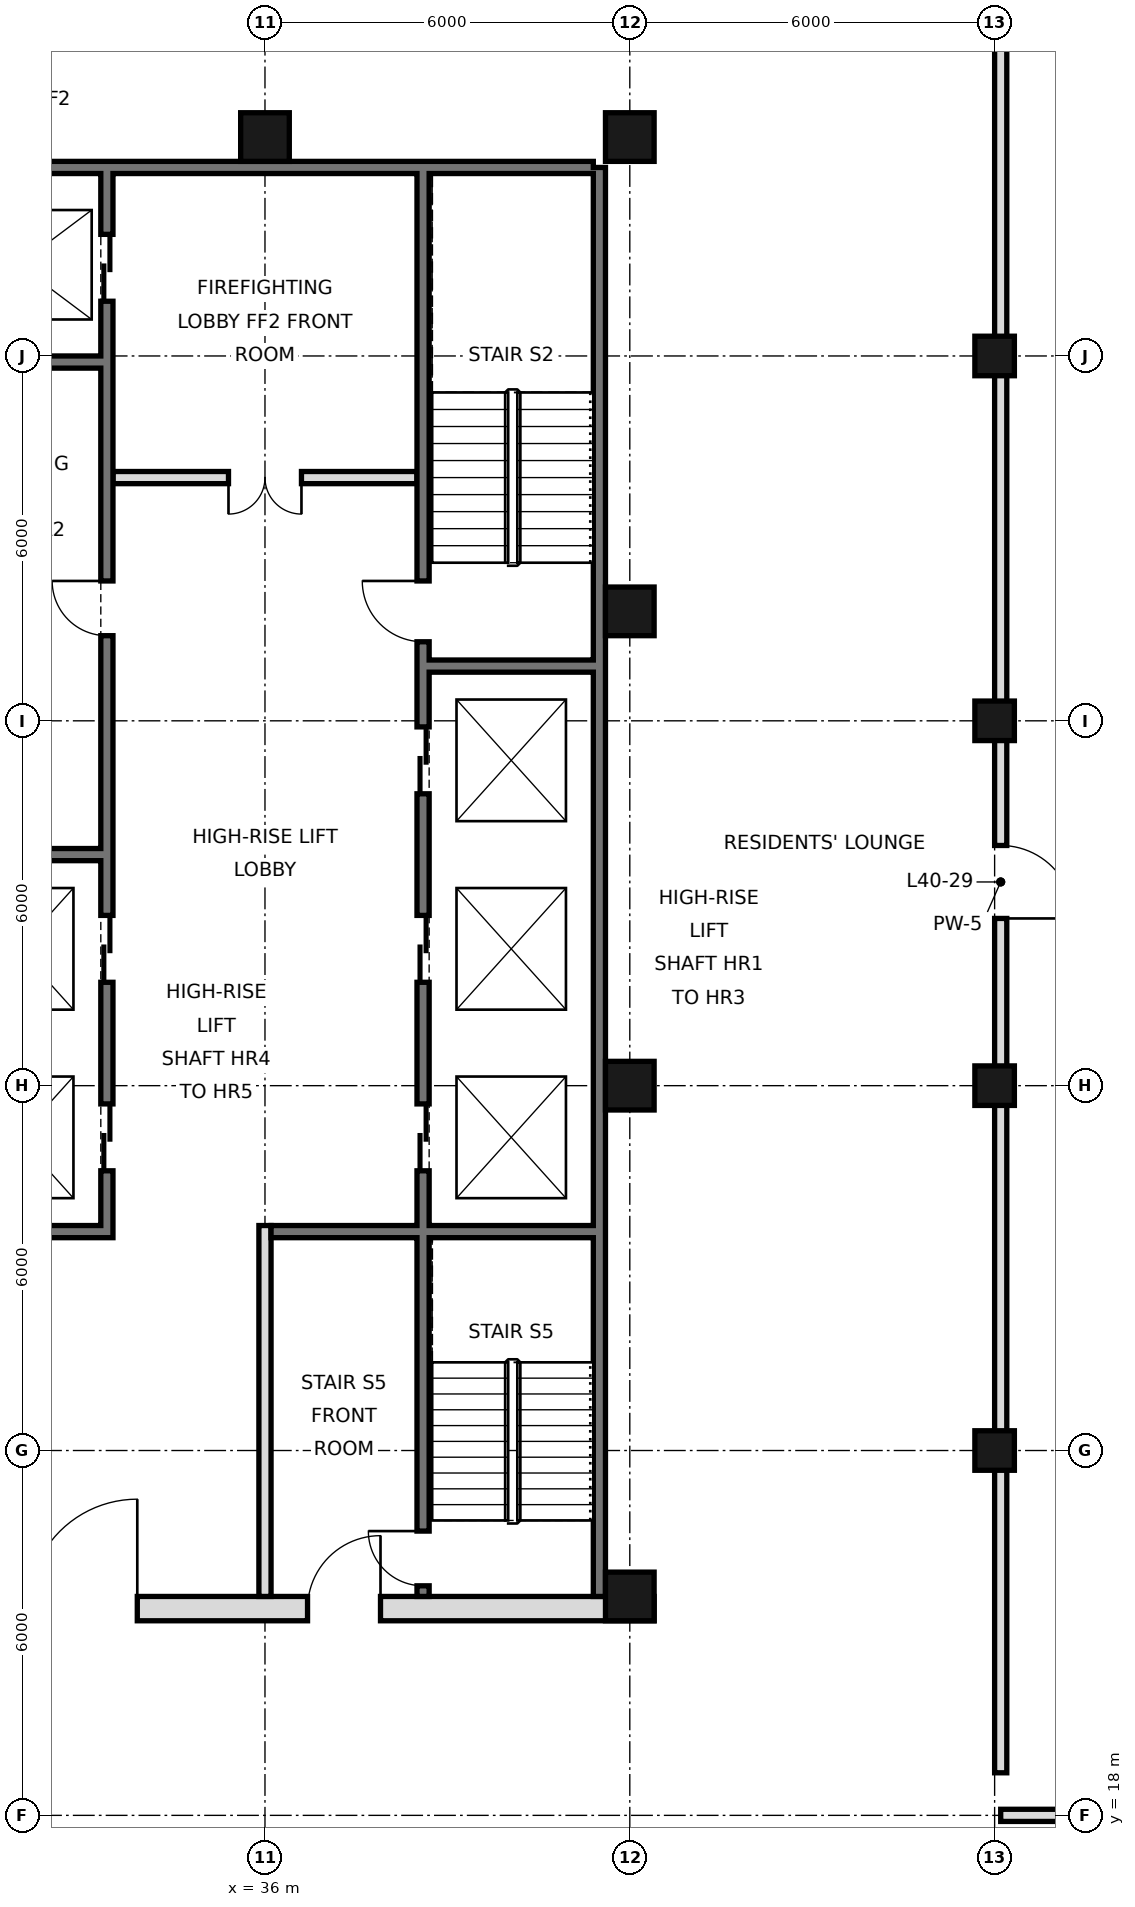
"""IFC4 building model, lengths in metres.
Left out: names, types, materials, properties, quantities, classifications, styles, units other than length and angle.
Written with IfcOpenShell. Run it as: python <this file> out.ifc"""

import sys

from ifc_helpers import new_model, si_unit, direction, frame, frame_2d, origin, origin_2d, place, context, subcontext, project, spatial, rectangle, hollow_rectangle, extrude, element, fill, save


model = new_model("IFC4")
c1 = context("Model", 3, precision=1e-05, world=origin(), true_north=direction((0.0, 1.0)))
c2 = subcontext(c1, "Body", "Model", "MODEL_VIEW")
j1 = project(units=[si_unit("LENGTHUNIT", "METRE"), si_unit("PLANEANGLEUNIT", "RADIAN")], contexts=[c1])
p1 = place(None, origin())
s1 = spatial("IfcSite", under=j1, at=p1, CompositionType="ELEMENT")
p2 = place(p1, origin())
s2 = spatial("IfcBuilding", under=s1, at=p2, CompositionType="ELEMENT")
p3 = place(p2, frame((0.0, 0.0, 174.4)))
s3 = spatial("IfcBuildingStorey", under=s2, at=p3, CompositionType="ELEMENT", Elevation=174.4)
for number, where, z_axis, x_axis in (
    (1, (36.0, 45.6, 0.0), (0.0, 0.0, 1.0), (1.0, 0.0, 0.0)),
    (2, (42.0, 21.6, 0.0), (0.0, 0.0, 1.0), (1.0, 0.0, 0.0)),
    (3, (42.0, 30.0, 0.0), (0.0, 0.0, 1.0), (1.0, 0.0, 0.0)),
    (4, (42.0, 37.8, 0.0), (0.0, 0.0, 1.0), (1.0, 0.0, 0.0)),
    (5, (42.0, 45.6, 0.0), (0.0, 0.0, 1.0), (1.0, 0.0, 0.0)),
):
    element("IfcColumn", number, at=place(p3, frame(where, z_axis=z_axis, x_axis=x_axis)), inside=s3, PredefinedType="COLUMN", context=c2, shape_type="SweptSolid", body=[
        extrude(hollow_rectangle(XDim=0.8, YDim=0.8, WallThickness=0.045, at=origin_2d()), origin(), (0.0, 0.0, 1.0), 3.6),
    ])
for number, where, z_axis, x_axis in (
    (6, (48.0, 24.0, 0.0), (0.0, 0.0, 1.0), (1.0, 0.0, 0.0)),
    (7, (48.0, 30.0, 0.0), (0.0, 0.0, 1.0), (1.0, 0.0, 0.0)),
    (8, (48.0, 36.0, 0.0), (0.0, 0.0, 1.0), (1.0, 0.0, 0.0)),
    (9, (48.0, 42.0, 0.0), (0.0, 0.0, 1.0), (1.0, 0.0, 0.0)),
):
    element("IfcColumn", number, at=place(p3, frame(where, z_axis=z_axis, x_axis=x_axis)), inside=s3, PredefinedType="COLUMN", context=c2, shape_type="SweptSolid", body=[
        extrude(hollow_rectangle(XDim=0.65, YDim=0.65, WallThickness=0.032, at=origin_2d()), origin(), (0.0, 0.0, 1.0), 3.6),
    ])
p4 = place(p3, frame((48.1, 18.7, 0.0), z_axis=(0.0, 0.0, 1.0), x_axis=(0.0, 1.0, 0.0)))
e10 = element("IfcWall", 10, at=p4, inside=s3, PredefinedType="SOLIDWALL", context=c2, shape_type="SweptSolid", body=[
    extrude(rectangle(XDim=29.3, YDim=0.2, at=frame_2d((14.65, 0.0))), origin(), (0.0, 0.0, 1.0), 2.72),
])
p5 = place(p4, frame((14.05, 0.0, 0.0)))
e11 = element("IfcOpeningElement", 11, at=p5, cuts=e10, PredefinedType="OPENING", context=c2, shape_type="SweptSolid", body=[
    extrude(rectangle(XDim=1.2, YDim=2.4, at=frame_2d((0.6, 1.2))), frame((0.0, 0.11, 0.0), z_axis=(0.0, -1.0, 0.0), x_axis=(1.0, 0.0, 0.0)), (0.0, 0.0, 1.0), 0.22),
])
p6 = place(p3, frame((48.1, 18.0, 0.0), z_axis=(0.0, 0.0, 1.0), x_axis=(1.0, 0.0, 0.0)))
e12 = element("IfcWall", 12, at=p6, inside=s3, PredefinedType="SOLIDWALL", context=c2, shape_type="SweptSolid", body=[
    extrude(rectangle(XDim=7.1, YDim=0.2, at=frame_2d((3.55, 0.0))), origin(), (0.0, 0.0, 1.0), 2.72),
])
p7 = place(p3, frame((41.5, 21.6, 0.0), z_axis=(0.0, 0.0, 1.0), x_axis=(0.0, 1.0, 0.0)))
e13 = element("IfcWall", 13, at=p7, inside=s3, PredefinedType="SOLIDWALL", context=c2, shape_type="SweptSolid", body=[
    extrude(rectangle(XDim=23.5, YDim=0.2, at=frame_2d((11.75, 0.0))), origin(), (0.0, 0.0, 1.0), 3.42),
])
p8 = place(p3, frame((6.6, 45.1, 0.0), z_axis=(0.0, 0.0, 1.0), x_axis=(1.0, 0.0, 0.0)))
e14 = element("IfcWall", 14, at=p8, inside=s3, PredefinedType="SOLIDWALL", context=c2, shape_type="SweptSolid", body=[
    extrude(rectangle(XDim=34.8, YDim=0.2, at=frame_2d((17.4, 0.0))), origin(), (0.0, 0.0, 1.0), 3.42),
])
p9 = place(p3, frame((5.6, 21.4, 0.0), z_axis=(0.0, 0.0, 1.0), x_axis=(1.0, 0.0, 0.0)))
e15 = element("IfcWall", 15, at=p9, inside=s3, PredefinedType="SOLIDWALL", context=c2, shape_type="SweptSolid", body=[
    extrude(rectangle(XDim=36.8, YDim=0.4, at=frame_2d((18.4, 0.0))), origin(), (0.0, 0.0, 1.0), 3.42),
])
p10 = place(p9, frame((8.5, 0.0, 0.0)))
e16 = element("IfcOpeningElement", 16, at=p10, cuts=e15, PredefinedType="OPENING", context=c2, shape_type="SweptSolid", body=[
    extrude(rectangle(XDim=1.8, YDim=2.1, at=frame_2d((0.9, 1.05))), frame((0.0, 0.21, 0.0), z_axis=(0.0, -1.0, 0.0), x_axis=(1.0, 0.0, 0.0)), (0.0, 0.0, 1.0), 0.42),
])
p11 = place(p9, frame((17.5, 0.0, 0.0)))
e17 = element("IfcOpeningElement", 17, at=p11, cuts=e15, PredefinedType="OPENING", context=c2, shape_type="SweptSolid", body=[
    extrude(rectangle(XDim=1.8, YDim=2.1, at=frame_2d((0.9, 1.05))), frame((0.0, 0.21, 0.0), z_axis=(0.0, -1.0, 0.0), x_axis=(1.0, 0.0, 0.0)), (0.0, 0.0, 1.0), 0.42),
])
p12 = place(p9, frame((26.5, 0.0, 0.0)))
e18 = element("IfcOpeningElement", 18, at=p12, cuts=e15, PredefinedType="OPENING", context=c2, shape_type="SweptSolid", body=[
    extrude(rectangle(XDim=1.8, YDim=2.1, at=frame_2d((0.9, 1.05))), frame((0.0, 0.21, 0.0), z_axis=(0.0, -1.0, 0.0), x_axis=(1.0, 0.0, 0.0)), (0.0, 0.0, 1.0), 0.42),
])
p13 = place(p9, frame((4.5, 0.0, 0.0)))
e19 = element("IfcOpeningElement", 19, at=p13, cuts=e15, PredefinedType="OPENING", context=c2, shape_type="SweptSolid", body=[
    extrude(rectangle(XDim=1.2, YDim=2.1, at=frame_2d((0.6, 1.05))), frame((0.0, 0.21, 0.0), z_axis=(0.0, -1.0, 0.0), x_axis=(1.0, 0.0, 0.0)), (0.0, 0.0, 1.0), 0.42),
])
p14 = place(p9, frame((31.1, 0.0, 0.0)))
e20 = element("IfcOpeningElement", 20, at=p14, cuts=e15, PredefinedType="OPENING", context=c2, shape_type="SweptSolid", body=[
    extrude(rectangle(XDim=1.2, YDim=2.1, at=frame_2d((0.6, 1.05))), frame((0.0, 0.21, 0.0), z_axis=(0.0, -1.0, 0.0), x_axis=(1.0, 0.0, 0.0)), (0.0, 0.0, 1.0), 0.42),
])
p15 = place(p3, frame((33.4, 27.5, 0.0), z_axis=(0.0, 0.0, 1.0), x_axis=(0.0, 1.0, 0.0)))
e21 = element("IfcWall", 21, at=p15, inside=s3, PredefinedType="SOLIDWALL", context=c2, shape_type="SweptSolid", body=[
    extrude(rectangle(XDim=17.5, YDim=0.2, at=frame_2d((8.75, 0.0))), origin(), (0.0, 0.0, 1.0), 3.42),
])
p16 = place(p15, frame((1.1, 0.0, 0.0)))
e22 = element("IfcOpeningElement", 22, at=p16, cuts=e21, PredefinedType="OPENING", context=c2, shape_type="SweptSolid", body=[
    extrude(rectangle(XDim=1.1, YDim=2.1, at=frame_2d((0.55, 1.05))), frame((0.0, 0.11, 0.0), z_axis=(0.0, -1.0, 0.0), x_axis=(1.0, 0.0, 0.0)), (0.0, 0.0, 1.0), 0.22),
])
p17 = place(p15, frame((4.2, 0.0, 0.0)))
e23 = element("IfcOpeningElement", 23, at=p17, cuts=e21, PredefinedType="OPENING", context=c2, shape_type="SweptSolid", body=[
    extrude(rectangle(XDim=1.1, YDim=2.1, at=frame_2d((0.55, 1.05))), frame((0.0, 0.11, 0.0), z_axis=(0.0, -1.0, 0.0), x_axis=(1.0, 0.0, 0.0)), (0.0, 0.0, 1.0), 0.22),
])
p18 = place(p15, frame((15.4, 0.0, 0.0)))
e24 = element("IfcOpeningElement", 24, at=p18, cuts=e21, PredefinedType="OPENING", context=c2, shape_type="SweptSolid", body=[
    extrude(rectangle(XDim=1.1, YDim=2.1, at=frame_2d((0.55, 1.05))), frame((0.0, 0.11, 0.0), z_axis=(0.0, -1.0, 0.0), x_axis=(1.0, 0.0, 0.0)), (0.0, 0.0, 1.0), 0.22),
])
p19 = place(p15, frame((9.9, 0.0, 0.0)))
e25 = element("IfcOpeningElement", 25, at=p19, cuts=e21, PredefinedType="OPENING", context=c2, shape_type="SweptSolid", body=[
    extrude(rectangle(XDim=0.9, YDim=2.1, at=frame_2d((0.45, 1.05))), frame((0.0, 0.11, 0.0), z_axis=(0.0, -1.0, 0.0), x_axis=(1.0, 0.0, 0.0)), (0.0, 0.0, 1.0), 0.22),
])
p20 = place(p3, frame((36.0, 21.6, 0.0), z_axis=(0.0, 0.0, 1.0), x_axis=(0.0, 1.0, 0.0)))
e26 = element("IfcWall", 26, at=p20, inside=s3, PredefinedType="PARTITIONING", context=c2, shape_type="SweptSolid", body=[
    extrude(rectangle(XDim=6.1, YDim=0.2, at=frame_2d((3.05, 0.0))), origin(), (0.0, 0.0, 1.0), 3.42),
])
p21 = place(p3, frame((38.6, 21.6, 0.0), z_axis=(0.0, 0.0, 1.0), x_axis=(0.0, 1.0, 0.0)))
e27 = element("IfcWall", 27, at=p21, inside=s3, PredefinedType="SOLIDWALL", context=c2, shape_type="SweptSolid", body=[
    extrude(rectangle(XDim=23.4, YDim=0.2, at=frame_2d((11.7, 0.0))), origin(), (0.0, 0.0, 1.0), 3.42),
])
p22 = place(p21, frame((7.0, 0.0, 0.0)))
e28 = element("IfcOpeningElement", 28, at=p22, cuts=e27, PredefinedType="OPENING", context=c2, shape_type="SweptSolid", body=[
    extrude(rectangle(XDim=1.1, YDim=2.1, at=frame_2d((0.55, 1.05))), frame((0.0, 0.11, 0.0), z_axis=(0.0, -1.0, 0.0), x_axis=(1.0, 0.0, 0.0)), (0.0, 0.0, 1.0), 0.22),
])
p23 = place(p21, frame((10.1, 0.0, 0.0)))
e29 = element("IfcOpeningElement", 29, at=p23, cuts=e27, PredefinedType="OPENING", context=c2, shape_type="SweptSolid", body=[
    extrude(rectangle(XDim=1.1, YDim=2.1, at=frame_2d((0.55, 1.05))), frame((0.0, 0.11, 0.0), z_axis=(0.0, -1.0, 0.0), x_axis=(1.0, 0.0, 0.0)), (0.0, 0.0, 1.0), 0.22),
])
p24 = place(p21, frame((13.2, 0.0, 0.0)))
e30 = element("IfcOpeningElement", 30, at=p24, cuts=e27, PredefinedType="OPENING", context=c2, shape_type="SweptSolid", body=[
    extrude(rectangle(XDim=1.1, YDim=2.1, at=frame_2d((0.55, 1.05))), frame((0.0, 0.11, 0.0), z_axis=(0.0, -1.0, 0.0), x_axis=(1.0, 0.0, 0.0)), (0.0, 0.0, 1.0), 0.22),
])
p25 = place(p21, frame((15.7, 0.0, 0.0)))
e31 = element("IfcOpeningElement", 31, at=p25, cuts=e27, PredefinedType="OPENING", context=c2, shape_type="SweptSolid", body=[
    extrude(rectangle(XDim=1.0, YDim=2.1, at=frame_2d((0.5, 1.05))), frame((0.0, 0.11, 0.0), z_axis=(0.0, -1.0, 0.0), x_axis=(1.0, 0.0, 0.0)), (0.0, 0.0, 1.0), 0.22),
])
p26 = place(p21, frame((0.175, 0.0, 0.0)))
e32 = element("IfcOpeningElement", 32, at=p26, cuts=e27, PredefinedType="OPENING", context=c2, shape_type="SweptSolid", body=[
    extrude(rectangle(XDim=0.9, YDim=2.1, at=frame_2d((0.45, 1.05))), frame((0.0, 0.11, 0.0), z_axis=(0.0, -1.0, 0.0), x_axis=(1.0, 0.0, 0.0)), (0.0, 0.0, 1.0), 0.22),
])
p27 = place(p3, frame((30.6, 27.6, 0.0), z_axis=(0.0, 0.0, 1.0), x_axis=(1.0, 0.0, 0.0)))
e33 = element("IfcWall", 33, at=p27, inside=s3, PredefinedType="SOLIDWALL", context=c2, shape_type="SweptSolid", body=[
    extrude(rectangle(XDim=2.7, YDim=0.2, at=frame_2d((1.35, 0.0))), origin(), (0.0, 0.0, 1.0), 3.42),
])
p28 = place(p3, frame((36.1, 27.6, 0.0), z_axis=(0.0, 0.0, 1.0), x_axis=(1.0, 0.0, 0.0)))
e34 = element("IfcWall", 34, at=p28, inside=s3, PredefinedType="SOLIDWALL", context=c2, shape_type="SweptSolid", body=[
    extrude(rectangle(XDim=5.3, YDim=0.2, at=frame_2d((2.65, 0.0))), origin(), (0.0, 0.0, 1.0), 3.42),
])
for number, where, z_axis, x_axis in (
    (35, (30.6, 33.8, 0.0), (0.0, 0.0, 1.0), (1.0, 0.0, 0.0)),
    (36, (38.7, 36.9, 0.0), (0.0, 0.0, 1.0), (1.0, 0.0, 0.0)),
):
    element("IfcWall", number, at=place(p3, frame(where, z_axis=z_axis, x_axis=x_axis)), inside=s3, PredefinedType="SOLIDWALL", context=c2, shape_type="SweptSolid", body=[
        extrude(rectangle(XDim=2.7, YDim=0.2, at=frame_2d((1.35, 0.0))), origin(), (0.0, 0.0, 1.0), 3.42),
    ])
p29 = place(p3, frame((33.5, 40.0, 0.0), z_axis=(0.0, 0.0, 1.0), x_axis=(1.0, 0.0, 0.0)))
e37 = element("IfcWall", 37, at=p29, inside=s3, PredefinedType="PARTITIONING", context=c2, shape_type="SweptSolid", body=[
    extrude(rectangle(XDim=5.0, YDim=0.2, at=frame_2d((2.5, 0.0))), origin(), (0.0, 0.0, 1.0), 3.42),
])
p30 = place(p29, frame((1.9, 0.0, 0.0)))
e38 = element("IfcOpeningElement", 38, at=p30, cuts=e37, PredefinedType="OPENING", context=c2, shape_type="SweptSolid", body=[
    extrude(rectangle(XDim=1.2, YDim=2.1, at=frame_2d((0.6, 1.05))), frame((0.0, 0.11, 0.0), z_axis=(0.0, -1.0, 0.0), x_axis=(1.0, 0.0, 0.0)), (0.0, 0.0, 1.0), 0.22),
])
p31 = place(p3, frame((30.6, 41.9, 0.0), z_axis=(0.0, 0.0, 1.0), x_axis=(1.0, 0.0, 0.0)))
e39 = element("IfcWall", 39, at=p31, inside=s3, PredefinedType="SOLIDWALL", context=c2, shape_type="SweptSolid", body=[
    extrude(rectangle(XDim=2.7, YDim=0.2, at=frame_2d((1.35, 0.0))), origin(), (0.0, 0.0, 1.0), 3.42),
])
p32 = place(p5, frame((1.2, 0.0, 0.0), z_axis=(0.0, 0.0, 1.0), x_axis=(-1.0, 0.0, 0.0)))
e40 = element("IfcDoor", 40, at=p32, inside=s3, OperationType="SINGLE_SWING_RIGHT", PredefinedType="DOOR", context=c2, shape_type="SweptSolid", body=[
    extrude(rectangle(XDim=1.2, YDim=2.4, at=frame_2d((0.6, 1.2))), frame((0.0, 0.025, 0.0), z_axis=(0.0, -1.0, 0.0), x_axis=(1.0, 0.0, 0.0)), (0.0, 0.0, 1.0), 0.05),
])
fill(e11, e40)
p33 = place(p12, frame((1.8, 0.0, 0.0), z_axis=(0.0, 0.0, 1.0), x_axis=(-1.0, 0.0, 0.0)))
e41 = element("IfcDoor", 41, at=p33, inside=s3, OperationType="SINGLE_SWING_LEFT", PredefinedType="DOOR", context=c2, shape_type="SweptSolid", body=[
    extrude(rectangle(XDim=1.8, YDim=2.1, at=frame_2d((0.9, 1.05))), frame((0.0, 0.025, 0.0), z_axis=(0.0, -1.0, 0.0), x_axis=(1.0, 0.0, 0.0)), (0.0, 0.0, 1.0), 0.05),
])
fill(e18, e41)
p34 = place(p14, frame((1.2, 0.0, 0.0), z_axis=(0.0, 0.0, 1.0), x_axis=(-1.0, 0.0, 0.0)))
e42 = element("IfcDoor", 42, at=p34, inside=s3, OperationType="SINGLE_SWING_LEFT", PredefinedType="DOOR", context=c2, shape_type="SweptSolid", body=[
    extrude(rectangle(XDim=1.2, YDim=2.1, at=frame_2d((0.6, 1.05))), frame((0.0, 0.025, 0.0), z_axis=(0.0, -1.0, 0.0), x_axis=(1.0, 0.0, 0.0)), (0.0, 0.0, 1.0), 0.05),
])
fill(e20, e42)
p35 = place(p30, frame((1.2, 0.0, 0.0), z_axis=(0.0, 0.0, 1.0), x_axis=(-1.0, 0.0, 0.0)))
e43 = element("IfcDoor", 43, at=p35, inside=s3, OperationType="DOUBLE_DOOR_SINGLE_SWING", PredefinedType="DOOR", context=c2, shape_type="SweptSolid", body=[
    extrude(rectangle(XDim=1.2, YDim=2.1, at=frame_2d((0.6, 1.05))), frame((0.0, 0.025, 0.0), z_axis=(0.0, -1.0, 0.0), x_axis=(1.0, 0.0, 0.0)), (0.0, 0.0, 1.0), 0.05),
])
fill(e38, e43)
p36 = place(p22, origin())
e44 = element("IfcDoor", 44, at=p36, inside=s3, OperationType="DOUBLE_DOOR_SLIDING", PredefinedType="DOOR", context=c2, shape_type="SweptSolid", body=[
    extrude(rectangle(XDim=1.1, YDim=2.1, at=frame_2d((0.55, 1.05))), frame((0.0, 0.025, 0.0), z_axis=(0.0, -1.0, 0.0), x_axis=(1.0, 0.0, 0.0)), (0.0, 0.0, 1.0), 0.05),
])
fill(e28, e44)
p37 = place(p23, origin())
e45 = element("IfcDoor", 45, at=p37, inside=s3, OperationType="DOUBLE_DOOR_SLIDING", PredefinedType="DOOR", context=c2, shape_type="SweptSolid", body=[
    extrude(rectangle(XDim=1.1, YDim=2.1, at=frame_2d((0.55, 1.05))), frame((0.0, 0.025, 0.0), z_axis=(0.0, -1.0, 0.0), x_axis=(1.0, 0.0, 0.0)), (0.0, 0.0, 1.0), 0.05),
])
fill(e29, e45)
p38 = place(p24, origin())
e46 = element("IfcDoor", 46, at=p38, inside=s3, OperationType="DOUBLE_DOOR_SLIDING", PredefinedType="DOOR", context=c2, shape_type="SweptSolid", body=[
    extrude(rectangle(XDim=1.1, YDim=2.1, at=frame_2d((0.55, 1.05))), frame((0.0, 0.025, 0.0), z_axis=(0.0, -1.0, 0.0), x_axis=(1.0, 0.0, 0.0)), (0.0, 0.0, 1.0), 0.05),
])
fill(e30, e46)
p39 = place(p16, origin())
e47 = element("IfcDoor", 47, at=p39, inside=s3, OperationType="DOUBLE_DOOR_SLIDING", PredefinedType="DOOR", context=c2, shape_type="SweptSolid", body=[
    extrude(rectangle(XDim=1.1, YDim=2.1, at=frame_2d((0.55, 1.05))), frame((0.0, 0.025, 0.0), z_axis=(0.0, -1.0, 0.0), x_axis=(1.0, 0.0, 0.0)), (0.0, 0.0, 1.0), 0.05),
])
fill(e22, e47)
p40 = place(p17, origin())
e48 = element("IfcDoor", 48, at=p40, inside=s3, OperationType="DOUBLE_DOOR_SLIDING", PredefinedType="DOOR", context=c2, shape_type="SweptSolid", body=[
    extrude(rectangle(XDim=1.1, YDim=2.1, at=frame_2d((0.55, 1.05))), frame((0.0, 0.025, 0.0), z_axis=(0.0, -1.0, 0.0), x_axis=(1.0, 0.0, 0.0)), (0.0, 0.0, 1.0), 0.05),
])
fill(e23, e48)
p41 = place(p18, origin())
e49 = element("IfcDoor", 49, at=p41, inside=s3, OperationType="DOUBLE_DOOR_SLIDING", PredefinedType="DOOR", context=c2, shape_type="SweptSolid", body=[
    extrude(rectangle(XDim=1.1, YDim=2.1, at=frame_2d((0.55, 1.05))), frame((0.0, 0.025, 0.0), z_axis=(0.0, -1.0, 0.0), x_axis=(1.0, 0.0, 0.0)), (0.0, 0.0, 1.0), 0.05),
])
fill(e24, e49)
p42 = place(p25, frame((1.0, 0.0, 0.0), z_axis=(0.0, 0.0, 1.0), x_axis=(-1.0, 0.0, 0.0)))
e50 = element("IfcDoor", 50, at=p42, inside=s3, OperationType="SINGLE_SWING_LEFT", PredefinedType="DOOR", context=c2, shape_type="SweptSolid", body=[
    extrude(rectangle(XDim=1.0, YDim=2.1, at=frame_2d((0.5, 1.05))), frame((0.0, 0.025, 0.0), z_axis=(0.0, -1.0, 0.0), x_axis=(1.0, 0.0, 0.0)), (0.0, 0.0, 1.0), 0.05),
])
fill(e31, e50)
p43 = place(p26, frame((0.9, 0.0, 0.0), z_axis=(0.0, 0.0, 1.0), x_axis=(-1.0, 0.0, 0.0)))
e51 = element("IfcDoor", 51, at=p43, inside=s3, OperationType="SINGLE_SWING_LEFT", PredefinedType="DOOR", context=c2, shape_type="SweptSolid", body=[
    extrude(rectangle(XDim=0.9, YDim=2.1, at=frame_2d((0.45, 1.05))), frame((0.0, 0.025, 0.0), z_axis=(0.0, -1.0, 0.0), x_axis=(1.0, 0.0, 0.0)), (0.0, 0.0, 1.0), 0.05),
])
fill(e32, e51)
p44 = place(p19, frame((0.9, 0.0, 0.0), z_axis=(0.0, 0.0, 1.0), x_axis=(-1.0, 0.0, 0.0)))
e52 = element("IfcDoor", 52, at=p44, inside=s3, OperationType="SINGLE_SWING_LEFT", PredefinedType="DOOR", context=c2, shape_type="SweptSolid", body=[
    extrude(rectangle(XDim=0.9, YDim=2.1, at=frame_2d((0.45, 1.05))), frame((0.0, 0.025, 0.0), z_axis=(0.0, -1.0, 0.0), x_axis=(1.0, 0.0, 0.0)), (0.0, 0.0, 1.0), 0.05),
])
fill(e25, e52)
save(model, sys.argv[1])
